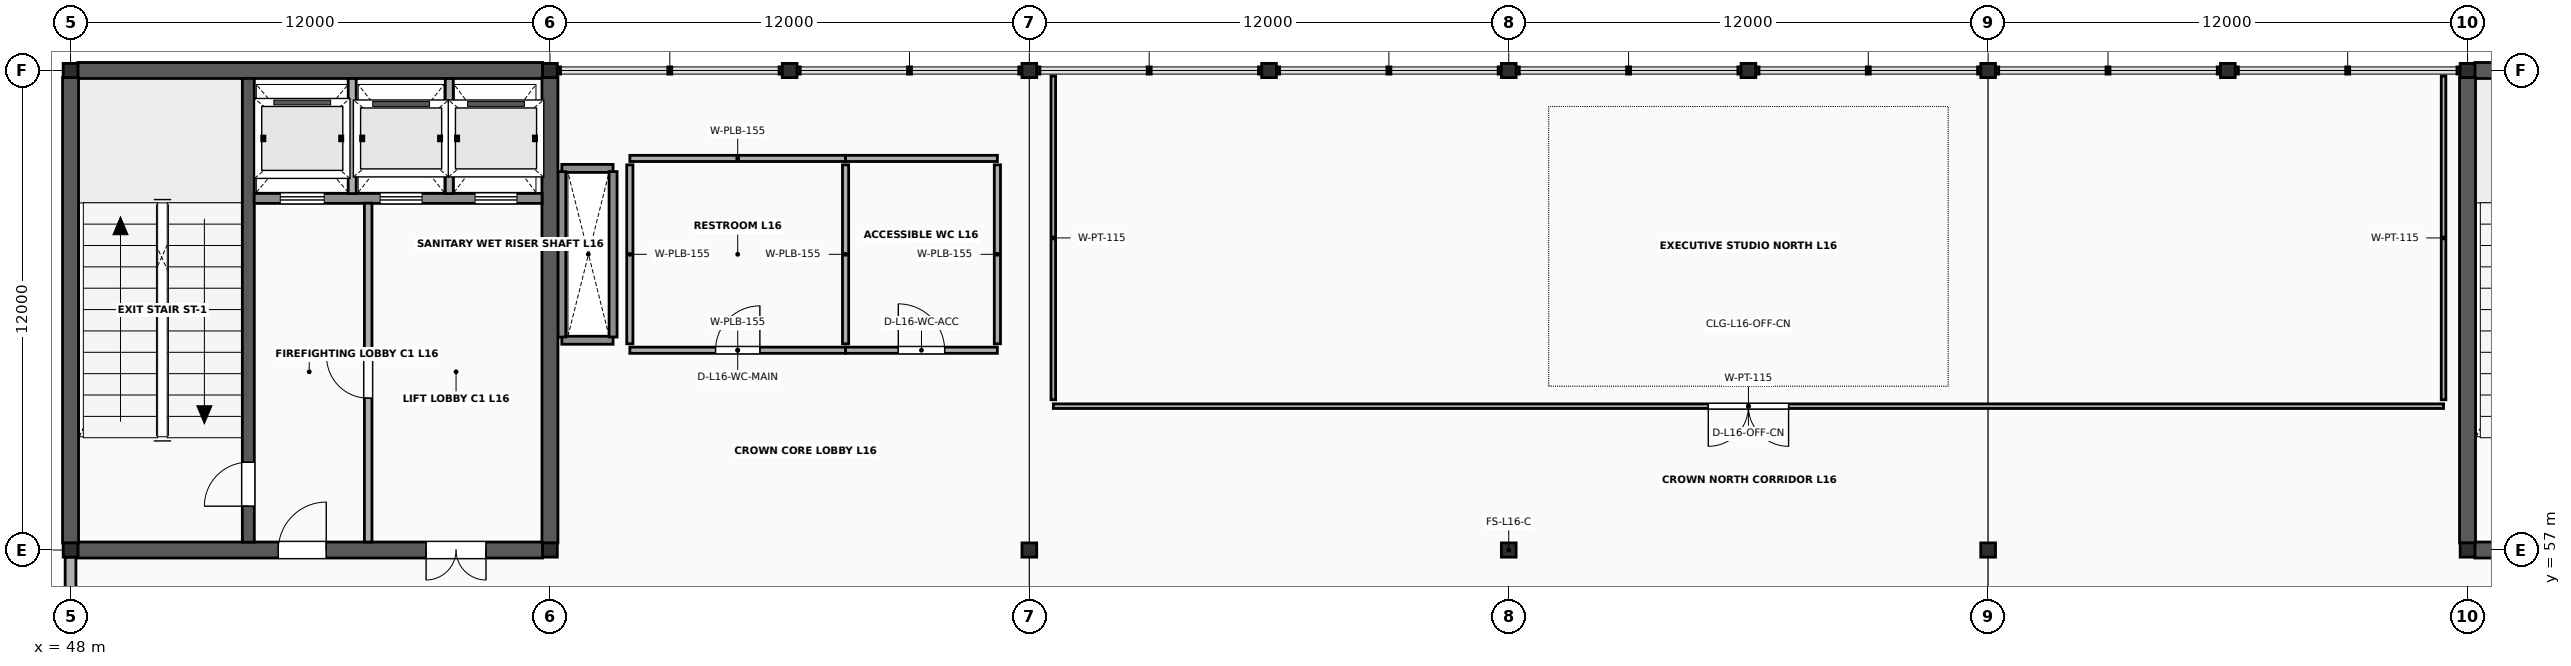
"""IFC4 building model, lengths in metres.
Left out: names, types, materials, properties, quantities, classifications, styles, units other than length and angle.
Written with IfcOpenShell. Run it as: python <this file> out.ifc"""

import sys

from ifc_helpers import new_model, si_unit, direction, frame, frame_2d, origin, origin_2d, place, context, subcontext, project, spatial, rectangle, i_section, extrude, element, fill, save


model = new_model("IFC4")
c1 = context("Model", 3, precision=1e-05, world=origin(), true_north=direction((0.0, 1.0)))
c2 = subcontext(c1, "Body", "Model", "MODEL_VIEW")
j1 = project(units=[si_unit("LENGTHUNIT", "METRE"), si_unit("PLANEANGLEUNIT", "RADIAN")], contexts=[c1])
p1 = place(None, origin())
s1 = spatial("IfcSite", under=j1, at=p1, CompositionType="ELEMENT")
p2 = place(p1, origin())
s2 = spatial("IfcBuilding", under=s1, at=p2, CompositionType="ELEMENT")
p3 = place(p2, frame((0.0, 0.0, 65.6)))
s3 = spatial("IfcBuildingStorey", under=s2, at=p3, CompositionType="ELEMENT", Elevation=65.6)
for number, where, z_axis, x_axis in (
    (1, (48.0, 57.0, 0.0), (0.0, 0.0, 1.0), (1.0, 0.0, 0.0)),
    (2, (48.0, 69.0, 0.0), (0.0, 0.0, 1.0), (1.0, 0.0, 0.0)),
    (3, (60.0, 57.0, 0.0), (0.0, 0.0, 1.0), (1.0, 0.0, 0.0)),
    (4, (60.0, 69.0, 0.0), (0.0, 0.0, 1.0), (1.0, 0.0, 0.0)),
    (5, (72.0, 57.0, 0.0), (0.0, 0.0, 1.0), (1.0, 0.0, 0.0)),
    (6, (72.0, 69.0, 0.0), (0.0, 0.0, 1.0), (1.0, 0.0, 0.0)),
    (7, (84.0, 57.0, 0.0), (0.0, 0.0, 1.0), (1.0, 0.0, 0.0)),
    (8, (84.0, 69.0, 0.0), (0.0, 0.0, 1.0), (1.0, 0.0, 0.0)),
    (9, (96.0, 57.0, 0.0), (0.0, 0.0, 1.0), (1.0, 0.0, 0.0)),
    (10, (96.0, 69.0, 0.0), (0.0, 0.0, 1.0), (1.0, 0.0, 0.0)),
    (11, (108.0, 57.0, 0.0), (0.0, 0.0, 1.0), (1.0, 0.0, 0.0)),
    (12, (108.0, 69.0, 0.0), (0.0, 0.0, 1.0), (1.0, 0.0, 0.0)),
    (13, (66.0, 69.0, 0.0), (0.0, 0.0, 1.0), (1.0, 0.0, 0.0)),
    (14, (78.0, 69.0, 0.0), (0.0, 0.0, 1.0), (1.0, 0.0, 0.0)),
    (15, (90.0, 69.0, 0.0), (0.0, 0.0, 1.0), (1.0, 0.0, 0.0)),
    (16, (102.0, 69.0, 0.0), (0.0, 0.0, 1.0), (1.0, 0.0, 0.0)),
):
    element("IfcColumn", number, at=place(p3, frame(where, z_axis=z_axis, x_axis=x_axis)), inside=s3, PredefinedType="COLUMN", context=c2, shape_type="SweptSolid", body=[
        extrude(i_section(OverallWidth=0.369, OverallDepth=0.356, WebThickness=0.011, FlangeThickness=0.018, FilletRadius=0.018, at=origin_2d()), origin(), (0.0, 0.0, 1.0), 4.0),
    ])
for number, where, z_axis, x_axis in (
    (17, (60.297, 62.25, 0.0), (0.0, 0.0, 1.0), (1.0, 0.0, 0.0)),
    (18, (60.297, 66.55, 0.0), (0.0, 0.0, 1.0), (1.0, 0.0, 0.0)),
):
    element("IfcWall", number, at=place(p3, frame(where, z_axis=z_axis, x_axis=x_axis)), inside=s3, PredefinedType="SOLIDWALL", context=c2, shape_type="SweptSolid", body=[
        extrude(rectangle(XDim=1.283, YDim=0.2, at=frame_2d((0.642, 0.0))), origin(), (0.0, 0.0, 1.0), 3.793),
    ])
for number, where, z_axis, x_axis in (
    (19, (60.297, 62.33, 0.0), (0.0, 0.0, 1.0), (0.0, 1.0, 0.0)),
    (20, (61.58, 62.33, 0.0), (0.0, 0.0, 1.0), (0.0, 1.0, 0.0)),
):
    element("IfcWall", number, at=place(p3, frame(where, z_axis=z_axis, x_axis=x_axis)), inside=s3, PredefinedType="SOLIDWALL", context=c2, shape_type="SweptSolid", body=[
        extrude(rectangle(XDim=4.14, YDim=0.2, at=frame_2d((2.07, 0.0))), origin(), (0.0, 0.0, 1.0), 3.793),
    ])
p4 = place(p3, frame((48.181, 57.0, 0.0), z_axis=(0.0, 0.0, 1.0), x_axis=(1.0, 0.0, 0.0)))
e21 = element("IfcWall", 21, at=p4, inside=s3, PredefinedType="SHEAR", context=c2, shape_type="SweptSolid", body=[
    extrude(rectangle(XDim=11.637, YDim=0.4, at=frame_2d((5.819, 0.0))), origin(), (0.0, 0.0, 1.0), 3.793),
])
p5 = place(p4, frame((5.019, 0.0, 0.0)))
e22 = element("IfcOpeningElement", 22, at=p5, cuts=e21, PredefinedType="OPENING", context=c2, shape_type="SweptSolid", body=[
    extrude(rectangle(XDim=1.2, YDim=2.2, at=frame_2d((0.6, 1.1))), frame((0.0, 0.215, 0.0), z_axis=(0.0, -1.0, 0.0), x_axis=(1.0, 0.0, 0.0)), (0.0, 0.0, 1.0), 0.43),
])
p6 = place(p4, frame((8.718, 0.0, 0.0)))
e23 = element("IfcOpeningElement", 23, at=p6, cuts=e21, PredefinedType="OPENING", context=c2, shape_type="SweptSolid", body=[
    extrude(rectangle(XDim=1.5, YDim=2.25, at=frame_2d((0.75, 1.125))), frame((0.0, 0.215, 0.0), z_axis=(0.0, -1.0, 0.0), x_axis=(1.0, 0.0, 0.0)), (0.0, 0.0, 1.0), 0.43),
])
p7 = place(p3, frame((48.181, 69.0, 0.0), z_axis=(0.0, 0.0, 1.0), x_axis=(1.0, 0.0, 0.0)))
e24 = element("IfcWall", 24, at=p7, inside=s3, PredefinedType="SHEAR", context=c2, shape_type="SweptSolid", body=[
    extrude(rectangle(XDim=11.637, YDim=0.4, at=frame_2d((5.819, 0.0))), origin(), (0.0, 0.0, 1.0), 3.793),
])
for number, where, z_axis, x_axis in (
    (25, (48.0, 57.175, 0.0), (0.0, 0.0, 1.0), (0.0, 1.0, 0.0)),
    (26, (60.0, 57.175, 0.0), (0.0, 0.0, 1.0), (0.0, 1.0, 0.0)),
):
    element("IfcWall", number, at=place(p3, frame(where, z_axis=z_axis, x_axis=x_axis)), inside=s3, PredefinedType="SHEAR", context=c2, shape_type="SweptSolid", body=[
        extrude(rectangle(XDim=11.65, YDim=0.4, at=frame_2d((5.825, 0.0))), origin(), (0.0, 0.0, 1.0), 3.793),
    ])
p8 = place(p3, frame((52.45, 57.197, 0.0), z_axis=(0.0, 0.0, 1.0), x_axis=(0.0, 1.0, 0.0)))
e27 = element("IfcWall", 27, at=p8, inside=s3, PredefinedType="SHEAR", context=c2, shape_type="SweptSolid", body=[
    extrude(rectangle(XDim=11.606, YDim=0.3, at=frame_2d((5.803, 0.0))), origin(), (0.0, 0.0, 1.0), 3.793),
])
p9 = place(p8, frame((0.9, 0.0, 0.0)))
e28 = element("IfcOpeningElement", 28, at=p9, cuts=e27, PredefinedType="OPENING", context=c2, shape_type="SweptSolid", body=[
    extrude(rectangle(XDim=1.1, YDim=2.2, at=frame_2d((0.55, 1.1))), frame((0.0, 0.165, 0.0), z_axis=(0.0, -1.0, 0.0), x_axis=(1.0, 0.0, 0.0)), (0.0, 0.0, 1.0), 0.33),
])
p10 = place(p3, frame((52.597, 65.8, 0.0), z_axis=(0.0, 0.0, 1.0), x_axis=(1.0, 0.0, 0.0)))
e29 = element("IfcWall", 29, at=p10, inside=s3, PredefinedType="SOLIDWALL", context=c2, shape_type="SweptSolid", body=[
    extrude(rectangle(XDim=7.206, YDim=0.25, at=frame_2d((3.603, 0.0))), origin(), (0.0, 0.0, 1.0), 3.793),
])
p11 = place(p10, frame((0.653, 0.0, 0.0)))
e30 = element("IfcOpeningElement", 30, at=p11, cuts=e29, PredefinedType="OPENING", context=c2, shape_type="SweptSolid", body=[
    extrude(rectangle(XDim=1.1, YDim=2.24, at=frame_2d((0.55, 1.12))), frame((0.0, 0.14, 0.0), z_axis=(0.0, -1.0, 0.0), x_axis=(1.0, 0.0, 0.0)), (0.0, 0.0, 1.0), 0.28),
])
p12 = place(p10, frame((3.153, 0.0, 0.0)))
e31 = element("IfcOpeningElement", 31, at=p12, cuts=e29, PredefinedType="OPENING", context=c2, shape_type="SweptSolid", body=[
    extrude(rectangle(XDim=1.05, YDim=2.2, at=frame_2d((0.525, 1.1))), frame((0.0, 0.14, 0.0), z_axis=(0.0, -1.0, 0.0), x_axis=(1.0, 0.0, 0.0)), (0.0, 0.0, 1.0), 0.28),
])
p13 = place(p10, frame((5.528, 0.0, 0.0)))
e32 = element("IfcOpeningElement", 32, at=p13, cuts=e29, PredefinedType="OPENING", context=c2, shape_type="SweptSolid", body=[
    extrude(rectangle(XDim=1.05, YDim=2.2, at=frame_2d((0.525, 1.1))), frame((0.0, 0.14, 0.0), z_axis=(0.0, -1.0, 0.0), x_axis=(1.0, 0.0, 0.0)), (0.0, 0.0, 1.0), 0.28),
])
for number, where, z_axis, x_axis in (
    (33, (55.05, 65.92, 0.0), (0.0, 0.0, 1.0), (0.0, 1.0, 0.0)),
    (34, (57.48, 65.92, 0.0), (0.0, 0.0, 1.0), (0.0, 1.0, 0.0)),
):
    element("IfcWall", number, at=place(p3, frame(where, z_axis=z_axis, x_axis=x_axis)), inside=s3, PredefinedType="SOLIDWALL", context=c2, shape_type="SweptSolid", body=[
        extrude(rectangle(XDim=2.88, YDim=0.2, at=frame_2d((1.44, 0.0))), origin(), (0.0, 0.0, 1.0), 3.783),
    ])
p14 = place(p3, frame((55.45, 57.2, 0.0), z_axis=(0.0, 0.0, 1.0), x_axis=(0.0, 1.0, 0.0)))
e35 = element("IfcWall", 35, at=p14, inside=s3, PredefinedType="SOLIDWALL", context=c2, shape_type="SweptSolid", body=[
    extrude(rectangle(XDim=8.48, YDim=0.19, at=frame_2d((4.24, 0.0))), origin(), (0.0, 0.0, 1.0), 3.783),
])
p15 = place(p14, frame((3.6, 0.0, 0.0)))
e36 = element("IfcOpeningElement", 36, at=p15, cuts=e35, PredefinedType="OPENING", context=c2, shape_type="SweptSolid", body=[
    extrude(rectangle(XDim=1.04, YDim=2.18, at=frame_2d((0.52, 1.09))), frame((0.0, 0.11, 0.0), z_axis=(0.0, -1.0, 0.0), x_axis=(1.0, 0.0, 0.0)), (0.0, 0.0, 1.0), 0.22),
])
p16 = place(p3, frame((108.181, 57.0, 0.0), z_axis=(0.0, 0.0, 1.0), x_axis=(1.0, 0.0, 0.0)))
e37 = element("IfcWall", 37, at=p16, inside=s3, PredefinedType="SHEAR", context=c2, shape_type="SweptSolid", body=[
    extrude(rectangle(XDim=11.637, YDim=0.4, at=frame_2d((5.819, 0.0))), origin(), (0.0, 0.0, 1.0), 3.793),
])
p17 = place(p16, frame((5.019, 0.0, 0.0)))
e38 = element("IfcOpeningElement", 38, at=p17, cuts=e37, PredefinedType="OPENING", context=c2, shape_type="SweptSolid", body=[
    extrude(rectangle(XDim=1.2, YDim=2.2, at=frame_2d((0.6, 1.1))), frame((0.0, 0.215, 0.0), z_axis=(0.0, -1.0, 0.0), x_axis=(1.0, 0.0, 0.0)), (0.0, 0.0, 1.0), 0.43),
])
p18 = place(p16, frame((8.719, 0.0, 0.0)))
e39 = element("IfcOpeningElement", 39, at=p18, cuts=e37, PredefinedType="OPENING", context=c2, shape_type="SweptSolid", body=[
    extrude(rectangle(XDim=1.5, YDim=2.25, at=frame_2d((0.75, 1.125))), frame((0.0, 0.215, 0.0), z_axis=(0.0, -1.0, 0.0), x_axis=(1.0, 0.0, 0.0)), (0.0, 0.0, 1.0), 0.43),
])
p19 = place(p3, frame((108.181, 69.0, 0.0), z_axis=(0.0, 0.0, 1.0), x_axis=(1.0, 0.0, 0.0)))
e40 = element("IfcWall", 40, at=p19, inside=s3, PredefinedType="SHEAR", context=c2, shape_type="SweptSolid", body=[
    extrude(rectangle(XDim=11.637, YDim=0.4, at=frame_2d((5.819, 0.0))), origin(), (0.0, 0.0, 1.0), 3.793),
])
p20 = place(p3, frame((108.0, 57.175, 0.0), z_axis=(0.0, 0.0, 1.0), x_axis=(0.0, 1.0, 0.0)))
e41 = element("IfcWall", 41, at=p20, inside=s3, PredefinedType="SHEAR", context=c2, shape_type="SweptSolid", body=[
    extrude(rectangle(XDim=11.65, YDim=0.4, at=frame_2d((5.825, 0.0))), origin(), (0.0, 0.0, 1.0), 3.793),
])
p21 = place(p3, frame((48.0, 45.176, 0.0), z_axis=(0.0, 0.0, 1.0), x_axis=(0.0, 1.0, 0.0)))
e42 = element("IfcWall", 42, at=p21, inside=s3, PredefinedType="SOLIDWALL", context=c2, shape_type="SweptSolid", body=[
    extrude(rectangle(XDim=11.648, YDim=0.27, at=frame_2d((5.824, 0.0))), origin(), (0.0, 0.0, 1.0), 3.246),
])
p22 = place(p21, frame((4.849, 0.0, 1.4)))
e43 = element("IfcOpeningElement", 43, at=p22, cuts=e42, PredefinedType="OPENING", context=c2, shape_type="SweptSolid", body=[
    extrude(rectangle(XDim=1.95, YDim=0.88, at=frame_2d((0.975, 0.44))), frame((0.0, 0.15, 0.0), z_axis=(0.0, -1.0, 0.0), x_axis=(1.0, 0.0, 0.0)), (0.0, 0.0, 1.0), 0.3),
])
p23 = place(p3, frame((62.0, 62.0, 0.0), z_axis=(0.0, 0.0, 1.0), x_axis=(1.0, 0.0, 0.0)))
e44 = element("IfcWall", 44, at=p23, inside=s3, PredefinedType="PLUMBINGWALL", context=c2, shape_type="SweptSolid", body=[
    extrude(rectangle(XDim=5.4, YDim=0.155, at=frame_2d((2.7, 0.0))), origin(), (0.0, 0.0, 1.0), 2.88),
])
p24 = place(p23, frame((2.145, 0.0, 0.0)))
e45 = element("IfcOpeningElement", 45, at=p24, cuts=e44, PredefinedType="OPENING", context=c2, shape_type="SweptSolid", body=[
    extrude(rectangle(XDim=1.11, YDim=2.21, at=frame_2d((0.555, 1.105))), frame((0.0, 0.093, 0.0), z_axis=(0.0, -1.0, 0.0), x_axis=(1.0, 0.0, 0.0)), (0.0, 0.0, 1.0), 0.185),
])
p25 = place(p3, frame((62.0, 66.8, 0.0), z_axis=(0.0, 0.0, 1.0), x_axis=(1.0, 0.0, 0.0)))
e46 = element("IfcWall", 46, at=p25, inside=s3, PredefinedType="PLUMBINGWALL", context=c2, shape_type="SweptSolid", body=[
    extrude(rectangle(XDim=5.4, YDim=0.155, at=frame_2d((2.7, 0.0))), origin(), (0.0, 0.0, 1.0), 2.88),
])
for number, where, z_axis, x_axis in (
    (47, (62.0, 62.16, 0.0), (0.0, 0.0, 1.0), (0.0, 1.0, 0.0)),
    (48, (67.4, 62.16, 0.0), (0.0, 0.0, 1.0), (0.0, 1.0, 0.0)),
):
    element("IfcWall", number, at=place(p3, frame(where, z_axis=z_axis, x_axis=x_axis)), inside=s3, PredefinedType="PLUMBINGWALL", context=c2, shape_type="SweptSolid", body=[
        extrude(rectangle(XDim=4.48, YDim=0.155, at=frame_2d((2.24, 0.0))), origin(), (0.0, 0.0, 1.0), 2.88),
    ])
p26 = place(p3, frame((67.4, 62.0, 0.0), z_axis=(0.0, 0.0, 1.0), x_axis=(1.0, 0.0, 0.0)))
e49 = element("IfcWall", 49, at=p26, inside=s3, PredefinedType="PLUMBINGWALL", context=c2, shape_type="SweptSolid", body=[
    extrude(rectangle(XDim=3.8, YDim=0.155, at=frame_2d((1.9, 0.0))), origin(), (0.0, 0.0, 1.0), 2.88),
])
p27 = place(p26, frame((1.32, 0.0, 0.0)))
e50 = element("IfcOpeningElement", 50, at=p27, cuts=e49, PredefinedType="OPENING", context=c2, shape_type="SweptSolid", body=[
    extrude(rectangle(XDim=1.16, YDim=2.23, at=frame_2d((0.58, 1.115))), frame((0.0, 0.093, 0.0), z_axis=(0.0, -1.0, 0.0), x_axis=(1.0, 0.0, 0.0)), (0.0, 0.0, 1.0), 0.185),
])
p28 = place(p3, frame((67.4, 66.8, 0.0), z_axis=(0.0, 0.0, 1.0), x_axis=(1.0, 0.0, 0.0)))
e51 = element("IfcWall", 51, at=p28, inside=s3, PredefinedType="PLUMBINGWALL", context=c2, shape_type="SweptSolid", body=[
    extrude(rectangle(XDim=3.8, YDim=0.155, at=frame_2d((1.9, 0.0))), origin(), (0.0, 0.0, 1.0), 2.88),
])
p29 = place(p3, frame((71.2, 62.16, 0.0), z_axis=(0.0, 0.0, 1.0), x_axis=(0.0, 1.0, 0.0)))
e52 = element("IfcWall", 52, at=p29, inside=s3, PredefinedType="PLUMBINGWALL", context=c2, shape_type="SweptSolid", body=[
    extrude(rectangle(XDim=4.48, YDim=0.155, at=frame_2d((2.24, 0.0))), origin(), (0.0, 0.0, 1.0), 2.88),
])
p30 = place(p3, frame((72.6, 60.6, 0.0), z_axis=(0.0, 0.0, 1.0), x_axis=(1.0, 0.0, 0.0)))
e53 = element("IfcWall", 53, at=p30, inside=s3, PredefinedType="PARTITIONING", context=c2, shape_type="SweptSolid", body=[
    extrude(rectangle(XDim=34.8, YDim=0.115, at=frame_2d((17.4, 0.0))), origin(), (0.0, 0.0, 1.0), 2.88),
])
p31 = place(p30, frame((16.395, 0.0, 0.0)))
e54 = element("IfcOpeningElement", 54, at=p31, cuts=e53, PredefinedType="OPENING", context=c2, shape_type="SweptSolid", body=[
    extrude(rectangle(XDim=2.01, YDim=2.45, at=frame_2d((1.005, 1.225))), frame((0.0, 0.073, 0.0), z_axis=(0.0, -1.0, 0.0), x_axis=(1.0, 0.0, 0.0)), (0.0, 0.0, 1.0), 0.145),
])
for number, where, z_axis, x_axis in (
    (55, (72.6, 60.76, 0.0), (0.0, 0.0, 1.0), (0.0, 1.0, 0.0)),
    (56, (107.4, 60.76, 0.0), (0.0, 0.0, 1.0), (0.0, 1.0, 0.0)),
):
    element("IfcWall", number, at=place(p3, frame(where, z_axis=z_axis, x_axis=x_axis)), inside=s3, PredefinedType="PARTITIONING", context=c2, shape_type="SweptSolid", body=[
        extrude(rectangle(XDim=8.1, YDim=0.115, at=frame_2d((4.05, 0.0))), origin(), (0.0, 0.0, 1.0), 2.88),
    ])
p32 = place(p9, origin())
e57 = element("IfcDoor", 57, at=p32, inside=s3, OperationType="SINGLE_SWING_LEFT", PredefinedType="DOOR", context=c2, shape_type="SweptSolid", body=[
    extrude(rectangle(XDim=1.1, YDim=2.2, at=frame_2d((0.55, 1.1))), frame((0.0, 0.025, 0.0), z_axis=(0.0, -1.0, 0.0), x_axis=(1.0, 0.0, 0.0)), (0.0, 0.0, 1.0), 0.05),
])
fill(e28, e57)
p33 = place(p15, origin())
e58 = element("IfcDoor", 58, at=p33, inside=s3, OperationType="SINGLE_SWING_RIGHT", PredefinedType="DOOR", context=c2, shape_type="SweptSolid", body=[
    extrude(rectangle(XDim=1.04, YDim=2.18, at=frame_2d((0.52, 1.09))), frame((0.0, 0.025, 0.0), z_axis=(0.0, -1.0, 0.0), x_axis=(1.0, 0.0, 0.0)), (0.0, 0.0, 1.0), 0.05),
])
fill(e36, e58)
p34 = place(p5, origin())
e59 = element("IfcDoor", 59, at=p34, inside=s3, OperationType="SINGLE_SWING_RIGHT", PredefinedType="DOOR", context=c2, shape_type="SweptSolid", body=[
    extrude(rectangle(XDim=1.2, YDim=2.2, at=frame_2d((0.6, 1.1))), frame((0.0, 0.025, 0.0), z_axis=(0.0, -1.0, 0.0), x_axis=(1.0, 0.0, 0.0)), (0.0, 0.0, 1.0), 0.05),
])
fill(e22, e59)
p35 = place(p6, origin())
e60 = element("IfcDoor", 60, at=p35, inside=s3, OperationType="DOUBLE_DOOR_SINGLE_SWING", PredefinedType="DOOR", context=c2, shape_type="SweptSolid", body=[
    extrude(rectangle(XDim=1.5, YDim=2.25, at=frame_2d((0.75, 1.125))), frame((0.0, 0.025, 0.0), z_axis=(0.0, -1.0, 0.0), x_axis=(1.0, 0.0, 0.0)), (0.0, 0.0, 1.0), 0.05),
])
fill(e23, e60)
p36 = place(p11, origin())
e61 = element("IfcDoor", 61, at=p36, inside=s3, OperationType="SLIDING_TO_LEFT", PredefinedType="USERDEFINED", context=c2, shape_type="SweptSolid", body=[
    extrude(rectangle(XDim=1.1, YDim=2.24, at=frame_2d((0.55, 1.12))), frame((0.0, 0.025, 0.0), z_axis=(0.0, -1.0, 0.0), x_axis=(1.0, 0.0, 0.0)), (0.0, 0.0, 1.0), 0.05),
])
fill(e30, e61)
p37 = place(p12, origin())
e62 = element("IfcDoor", 62, at=p37, inside=s3, OperationType="SLIDING_TO_LEFT", PredefinedType="USERDEFINED", context=c2, shape_type="SweptSolid", body=[
    extrude(rectangle(XDim=1.05, YDim=2.2, at=frame_2d((0.525, 1.1))), frame((0.0, 0.025, 0.0), z_axis=(0.0, -1.0, 0.0), x_axis=(1.0, 0.0, 0.0)), (0.0, 0.0, 1.0), 0.05),
])
fill(e31, e62)
p38 = place(p13, origin())
e63 = element("IfcDoor", 63, at=p38, inside=s3, OperationType="SLIDING_TO_LEFT", PredefinedType="USERDEFINED", context=c2, shape_type="SweptSolid", body=[
    extrude(rectangle(XDim=1.05, YDim=2.2, at=frame_2d((0.525, 1.1))), frame((0.0, 0.025, 0.0), z_axis=(0.0, -1.0, 0.0), x_axis=(1.0, 0.0, 0.0)), (0.0, 0.0, 1.0), 0.05),
])
fill(e32, e63)
p39 = place(p24, origin())
e64 = element("IfcDoor", 64, at=p39, inside=s3, OperationType="SINGLE_SWING_RIGHT", PredefinedType="DOOR", context=c2, shape_type="SweptSolid", body=[
    extrude(rectangle(XDim=1.11, YDim=2.21, at=frame_2d((0.555, 1.105))), frame((0.0, 0.025, 0.0), z_axis=(0.0, -1.0, 0.0), x_axis=(1.0, 0.0, 0.0)), (0.0, 0.0, 1.0), 0.05),
])
fill(e45, e64)
p40 = place(p27, origin())
e65 = element("IfcDoor", 65, at=p40, inside=s3, OperationType="SINGLE_SWING_LEFT", PredefinedType="DOOR", context=c2, shape_type="SweptSolid", body=[
    extrude(rectangle(XDim=1.16, YDim=2.23, at=frame_2d((0.58, 1.115))), frame((0.0, 0.025, 0.0), z_axis=(0.0, -1.0, 0.0), x_axis=(1.0, 0.0, 0.0)), (0.0, 0.0, 1.0), 0.05),
])
fill(e50, e65)
p41 = place(p31, origin())
e66 = element("IfcDoor", 66, at=p41, inside=s3, OperationType="DOUBLE_DOOR_SINGLE_SWING", PredefinedType="DOOR", context=c2, shape_type="SweptSolid", body=[
    extrude(rectangle(XDim=2.01, YDim=2.45, at=frame_2d((1.005, 1.225))), frame((0.0, 0.025, 0.0), z_axis=(0.0, -1.0, 0.0), x_axis=(1.0, 0.0, 0.0)), (0.0, 0.0, 1.0), 0.05),
])
fill(e54, e66)
save(model, sys.argv[1])
